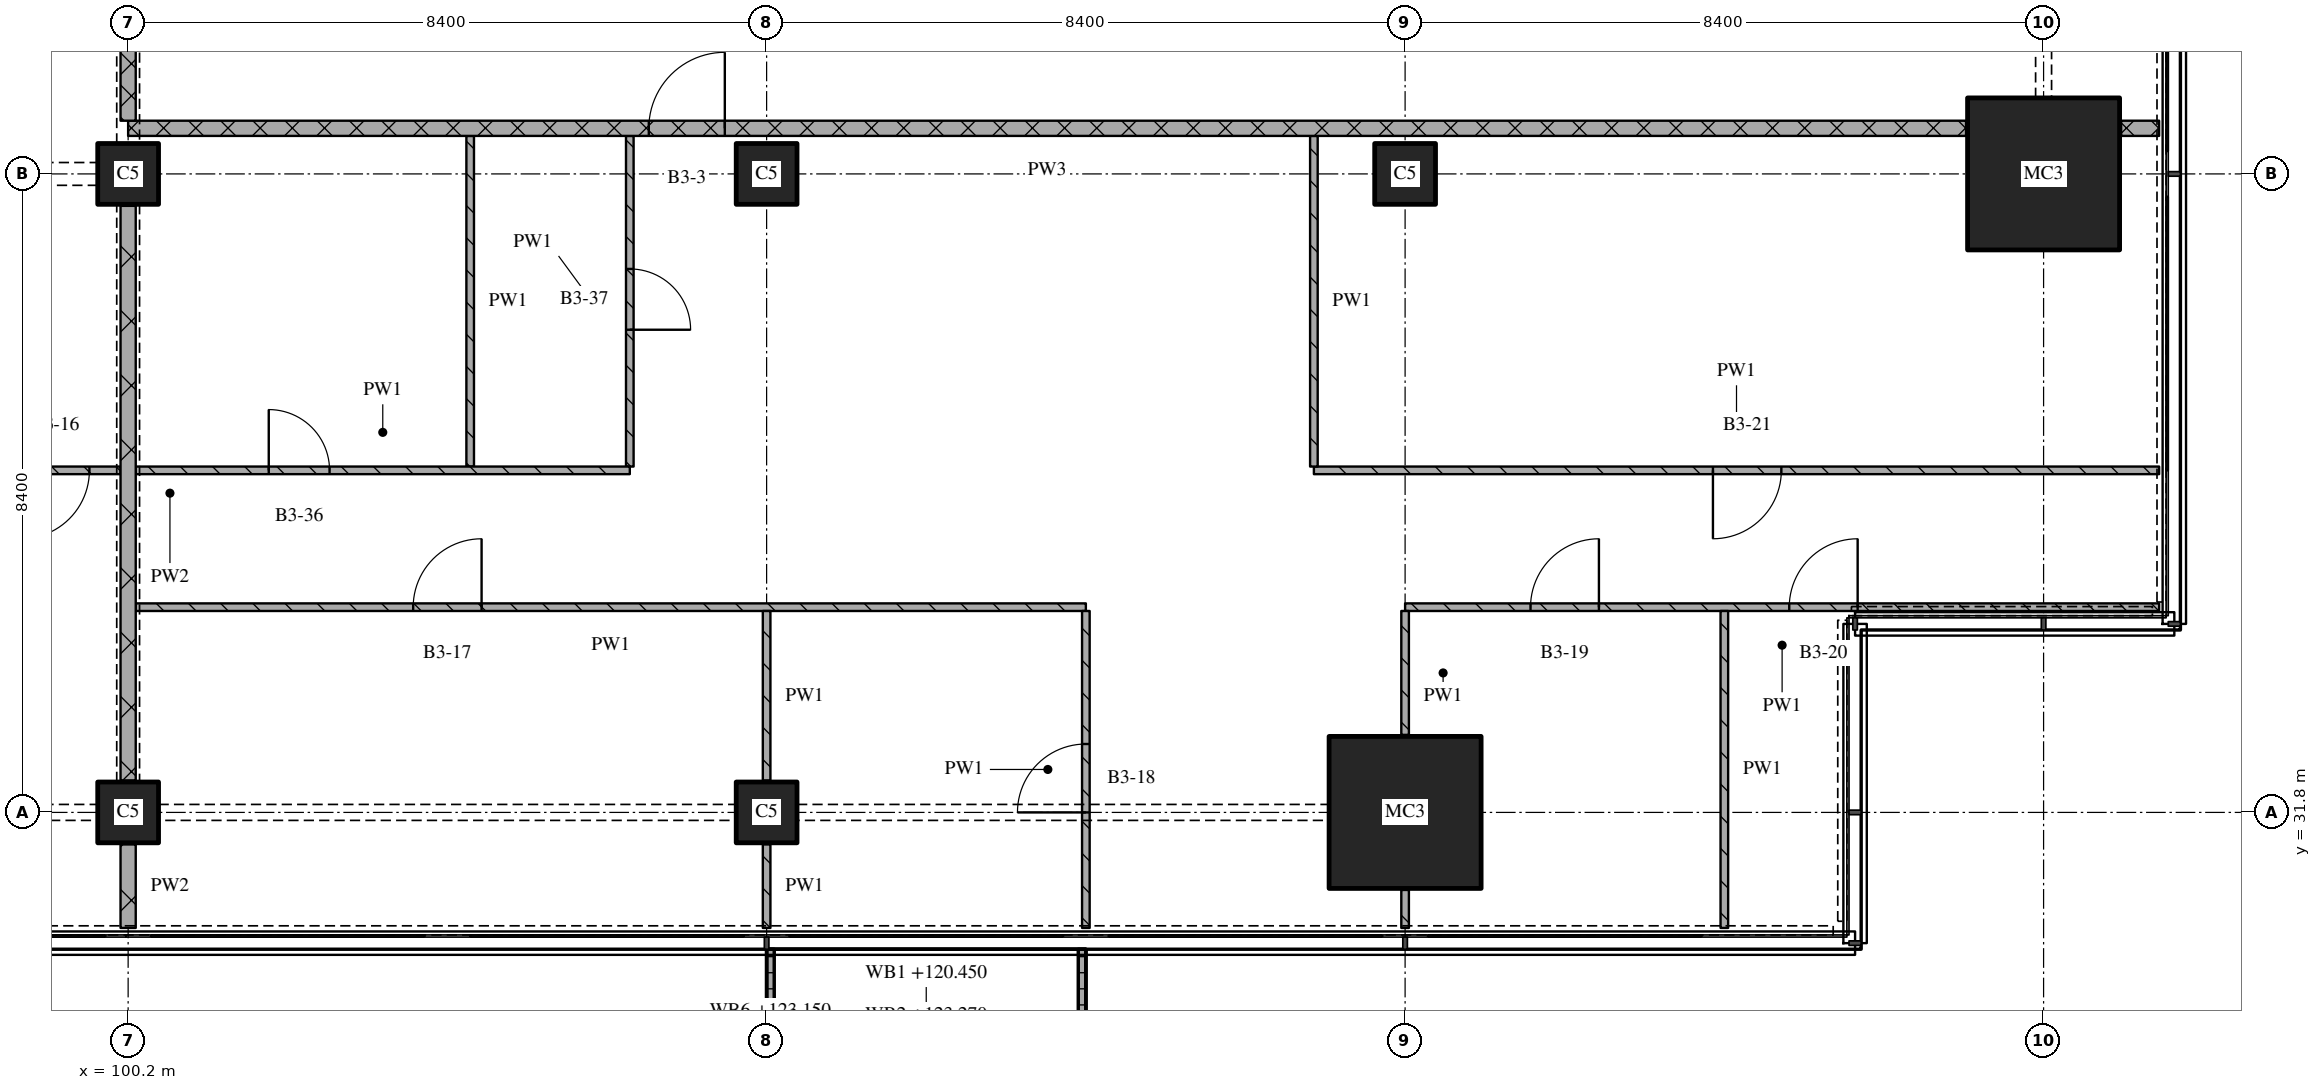
"""IFC4 building model, lengths in metres.
Left out: names, types, materials, properties, quantities, classifications, styles, units other than length and angle.
Written with IfcOpenShell. Run it as: python <this file> out.ifc"""

import sys

from ifc_helpers import new_model, si_unit, direction, frame, frame_2d, origin, origin_2d, place, context, subcontext, project, spatial, polyline, rectangle, outline, extrude, element, fill, save


model = new_model("IFC4")
c1 = context("Model", 3, precision=1e-05, world=origin(), true_north=direction((0.0, 1.0)))
c2 = subcontext(c1, "Body", "Model", "MODEL_VIEW")
j1 = project(units=[si_unit("LENGTHUNIT", "METRE"), si_unit("PLANEANGLEUNIT", "RADIAN")], contexts=[c1])
p1 = place(None, origin())
s1 = spatial("IfcSite", under=j1, at=p1, CompositionType="ELEMENT")
p2 = place(p1, origin())
s2 = spatial("IfcBuilding", under=s1, at=p2, CompositionType="ELEMENT")
p3 = place(p2, frame((0.0, 0.0, 120.45)))
s3 = spatial("IfcBuildingStorey", under=s2, at=p3, CompositionType="ELEMENT", Elevation=120.45)
for number, where, z_axis, x_axis in (
    (1, (100.2, 31.8, 0.0), (0.0, 0.0, 1.0), (1.0, 0.0, 0.0)),
    (2, (100.2, 40.2, 0.0), (0.0, 0.0, 1.0), (1.0, 0.0, 0.0)),
    (3, (108.6, 31.8, 0.0), (0.0, 0.0, 1.0), (1.0, 0.0, 0.0)),
    (4, (108.6, 40.2, 0.0), (0.0, 0.0, 1.0), (1.0, 0.0, 0.0)),
):
    element("IfcColumn", number, at=place(p3, frame(where, z_axis=z_axis, x_axis=x_axis)), inside=s3, PredefinedType="COLUMN", context=c2, shape_type="SweptSolid", body=[
        extrude(rectangle(XDim=0.8, YDim=0.8, at=origin_2d()), origin(), (0.0, 0.0, 1.0), 3.6),
    ])
p4 = place(p3, frame((117.0, 31.8, 0.0), z_axis=(0.0, 0.0, 1.0), x_axis=(1.0, 0.0, 0.0)))
e5 = element("IfcColumn", 5, at=p4, inside=s3, PredefinedType="COLUMN", context=c2, shape_type="SweptSolid", body=[
    extrude(rectangle(XDim=2.0, YDim=2.0, at=origin_2d()), origin(), (0.0, 0.0, 1.0), 3.6),
])
p5 = place(p3, frame((117.0, 40.2, 0.0), z_axis=(0.0, 0.0, 1.0), x_axis=(1.0, 0.0, 0.0)))
e6 = element("IfcColumn", 6, at=p5, inside=s3, PredefinedType="COLUMN", context=c2, shape_type="SweptSolid", body=[
    extrude(rectangle(XDim=0.8, YDim=0.8, at=origin_2d()), origin(), (0.0, 0.0, 1.0), 3.6),
])
p6 = place(p3, frame((125.4, 40.2, 0.0), z_axis=(0.0, 0.0, 1.0), x_axis=(1.0, 0.0, 0.0)))
e7 = element("IfcColumn", 7, at=p6, inside=s3, PredefinedType="COLUMN", context=c2, shape_type="SweptSolid", body=[
    extrude(rectangle(XDim=2.0, YDim=2.0, at=origin_2d()), origin(), (0.0, 0.0, 1.0), 3.6),
])
p7 = place(p3, origin())
e8 = element("IfcWall", 8, at=p7, inside=s3, PredefinedType="SOLIDWALL", context=c2, shape_type="SweptSolid", body=[
    extrude(outline(polyline([(108.6, 30.0), (108.7, 30.0), (108.7, 28.367), (112.7, 28.367), (112.7, 30.0), (112.8, 30.0), (112.8, 28.267), (108.6, 28.267), (108.6, 30.0)])), origin(), (0.0, 0.0, 1.0), 1.0),
])
p8 = place(p3, frame((112.8, 34.5, 0.0), z_axis=(0.0, 0.0, 1.0), x_axis=(-1.0, 0.0, 0.0)))
e9 = element("IfcWall", 9, at=p8, inside=s3, PredefinedType="PARTITIONING", context=c2, shape_type="SweptSolid", body=[
    extrude(rectangle(XDim=12.5, YDim=0.1, at=frame_2d((6.25, 0.0))), origin(), (0.0, 0.0, 1.0), 3.32),
])
p9 = place(p8, frame((7.95, 0.0, 0.0)))
e10 = element("IfcOpeningElement", 10, at=p9, cuts=e9, PredefinedType="OPENING", context=c2, shape_type="SweptSolid", body=[
    extrude(rectangle(XDim=0.9, YDim=2.1, at=frame_2d((0.45, 1.05))), frame((0.0, 0.06, 0.0), z_axis=(0.0, -1.0, 0.0), x_axis=(1.0, 0.0, 0.0)), (0.0, 0.0, 1.0), 0.12),
])
p10 = place(p3, frame((126.92, 34.5, 0.0), z_axis=(0.0, 0.0, 1.0), x_axis=(-1.0, 0.0, 0.0)))
e11 = element("IfcWall", 11, at=p10, inside=s3, PredefinedType="PARTITIONING", context=c2, shape_type="SweptSolid", body=[
    extrude(rectangle(XDim=9.92, YDim=0.1, at=frame_2d((4.96, 0.0))), origin(), (0.0, 0.0, 1.0), 3.32),
])
p11 = place(p10, frame((3.966, 0.0, 0.0)))
e12 = element("IfcOpeningElement", 12, at=p11, cuts=e11, PredefinedType="OPENING", context=c2, shape_type="SweptSolid", body=[
    extrude(rectangle(XDim=0.9, YDim=2.1, at=frame_2d((0.45, 1.05))), frame((0.0, 0.06, 0.0), z_axis=(0.0, -1.0, 0.0), x_axis=(1.0, 0.0, 0.0)), (0.0, 0.0, 1.0), 0.12),
])
p12 = place(p10, frame((7.37, 0.0, 0.0)))
e13 = element("IfcOpeningElement", 13, at=p12, cuts=e11, PredefinedType="OPENING", context=c2, shape_type="SweptSolid", body=[
    extrude(rectangle(XDim=0.9, YDim=2.1, at=frame_2d((0.45, 1.05))), frame((0.0, 0.06, 0.0), z_axis=(0.0, -1.0, 0.0), x_axis=(1.0, 0.0, 0.0)), (0.0, 0.0, 1.0), 0.12),
])
p13 = place(p3, frame((115.8, 36.3, 0.0), z_axis=(0.0, 0.0, 1.0), x_axis=(1.0, 0.0, 0.0)))
e14 = element("IfcWall", 14, at=p13, inside=s3, PredefinedType="PARTITIONING", context=c2, shape_type="SweptSolid", body=[
    extrude(rectangle(XDim=11.12, YDim=0.1, at=frame_2d((5.56, 0.0))), origin(), (0.0, 0.0, 1.0), 3.32),
])
p14 = place(p13, frame((5.25, 0.0, 0.0)))
e15 = element("IfcOpeningElement", 15, at=p14, cuts=e14, PredefinedType="OPENING", context=c2, shape_type="SweptSolid", body=[
    extrude(rectangle(XDim=0.9, YDim=2.1, at=frame_2d((0.45, 1.05))), frame((0.0, 0.06, 0.0), z_axis=(0.0, -1.0, 0.0), x_axis=(1.0, 0.0, 0.0)), (0.0, 0.0, 1.0), 0.12),
])
p15 = place(p3, frame((124.38, 40.8, 0.0), z_axis=(0.0, 0.0, 1.0), x_axis=(-1.0, 0.0, 0.0)))
e16 = element("IfcWall", 16, at=p15, inside=s3, PredefinedType="PARTITIONING", context=c2, shape_type="SweptSolid", body=[
    extrude(rectangle(XDim=24.18, YDim=0.2, at=frame_2d((12.09, 0.0))), origin(), (0.0, 0.0, 1.0), 3.32),
])
p16 = place(p15, frame((16.33, 0.0, 0.0)))
e17 = element("IfcOpeningElement", 17, at=p16, cuts=e16, PredefinedType="OPENING", context=c2, shape_type="SweptSolid", body=[
    extrude(rectangle(XDim=1.0, YDim=2.1, at=frame_2d((0.5, 1.05))), frame((0.0, 0.11, 0.0), z_axis=(0.0, -1.0, 0.0), x_axis=(1.0, 0.0, 0.0)), (0.0, 0.0, 1.0), 0.22),
])
p17 = place(p3, frame((126.42, 40.8, 0.0), z_axis=(0.0, 0.0, 1.0), x_axis=(1.0, 0.0, 0.0)))
e18 = element("IfcWall", 18, at=p17, inside=s3, PredefinedType="PARTITIONING", context=c2, shape_type="SweptSolid", body=[
    extrude(rectangle(XDim=0.5, YDim=0.2, at=frame_2d((0.25, 0.0))), origin(), (0.0, 0.0, 1.0), 3.32),
])
p18 = place(p3, frame((100.2, 43.1, 0.0), z_axis=(0.0, 0.0, 1.0), x_axis=(0.0, -1.0, 0.0)))
e19 = element("IfcWall", 19, at=p18, inside=s3, PredefinedType="PARTITIONING", context=c2, shape_type="SweptSolid", body=[
    extrude(rectangle(XDim=2.2, YDim=0.2, at=frame_2d((1.1, 0.0))), origin(), (0.0, 0.0, 1.0), 2.43),
])
p19 = place(p3, frame((100.2, 31.38, 0.0), z_axis=(0.0, 0.0, 1.0), x_axis=(0.0, -1.0, 0.0)))
e20 = element("IfcWall", 20, at=p19, inside=s3, PredefinedType="PARTITIONING", context=c2, shape_type="SweptSolid", body=[
    extrude(rectangle(XDim=1.1, YDim=0.2, at=frame_2d((0.55, 0.0))), origin(), (0.0, 0.0, 1.0), 3.32),
])
p20 = place(p3, frame((100.2, 39.78, 0.0), z_axis=(0.0, 0.0, 1.0), x_axis=(0.0, -1.0, 0.0)))
e21 = element("IfcWall", 21, at=p20, inside=s3, PredefinedType="PARTITIONING", context=c2, shape_type="SweptSolid", body=[
    extrude(rectangle(XDim=7.56, YDim=0.2, at=frame_2d((3.78, 0.0))), origin(), (0.0, 0.0, 1.0), 2.83),
])
p21 = place(p3, frame((104.7, 40.7, 0.0), z_axis=(0.0, 0.0, 1.0), x_axis=(0.0, -1.0, 0.0)))
e22 = element("IfcWall", 22, at=p21, inside=s3, PredefinedType="PARTITIONING", context=c2, shape_type="SweptSolid", body=[
    extrude(rectangle(XDim=4.35, YDim=0.1, at=frame_2d((2.175, 0.0))), origin(), (0.0, 0.0, 1.0), 3.32),
])
p22 = place(p3, frame((106.8, 36.35, 0.0), z_axis=(0.0, 0.0, 1.0), x_axis=(0.0, 1.0, 0.0)))
e23 = element("IfcWall", 23, at=p22, inside=s3, PredefinedType="PARTITIONING", context=c2, shape_type="SweptSolid", body=[
    extrude(rectangle(XDim=4.35, YDim=0.1, at=frame_2d((2.175, 0.0))), origin(), (0.0, 0.0, 1.0), 3.32),
])
p23 = place(p22, frame((1.8, 0.0, 0.0)))
e24 = element("IfcOpeningElement", 24, at=p23, cuts=e23, PredefinedType="OPENING", context=c2, shape_type="SweptSolid", body=[
    extrude(rectangle(XDim=0.8, YDim=2.1, at=frame_2d((0.4, 1.05))), frame((0.0, 0.06, 0.0), z_axis=(0.0, -1.0, 0.0), x_axis=(1.0, 0.0, 0.0)), (0.0, 0.0, 1.0), 0.12),
])
p24 = place(p3, frame((108.6, 31.38, 0.0), z_axis=(0.0, 0.0, 1.0), x_axis=(0.0, -1.0, 0.0)))
e25 = element("IfcWall", 25, at=p24, inside=s3, PredefinedType="PARTITIONING", context=c2, shape_type="SweptSolid", body=[
    extrude(rectangle(XDim=1.1, YDim=0.1, at=frame_2d((0.55, 0.0))), origin(), (0.0, 0.0, 1.0), 3.32),
])
p25 = place(p3, frame((108.6, 34.45, 0.0), z_axis=(0.0, 0.0, 1.0), x_axis=(0.0, -1.0, 0.0)))
e26 = element("IfcWall", 26, at=p25, inside=s3, PredefinedType="PARTITIONING", context=c2, shape_type="SweptSolid", body=[
    extrude(rectangle(XDim=2.23, YDim=0.1, at=frame_2d((1.115, 0.0))), origin(), (0.0, 0.0, 1.0), 3.32),
])
p26 = place(p3, frame((112.8, 30.28, 0.0), z_axis=(0.0, 0.0, 1.0), x_axis=(0.0, 1.0, 0.0)))
e27 = element("IfcWall", 27, at=p26, inside=s3, PredefinedType="PARTITIONING", context=c2, shape_type="SweptSolid", body=[
    extrude(rectangle(XDim=4.17, YDim=0.1, at=frame_2d((2.085, 0.0))), origin(), (0.0, 0.0, 1.0), 3.32),
])
p27 = place(p26, frame((1.52, 0.0, 0.0)))
e28 = element("IfcOpeningElement", 28, at=p27, cuts=e27, PredefinedType="OPENING", context=c2, shape_type="SweptSolid", body=[
    extrude(rectangle(XDim=0.9, YDim=2.1, at=frame_2d((0.45, 1.05))), frame((0.0, 0.06, 0.0), z_axis=(0.0, -1.0, 0.0), x_axis=(1.0, 0.0, 0.0)), (0.0, 0.0, 1.0), 0.12),
])
p28 = place(p3, frame((115.8, 40.7, 0.0), z_axis=(0.0, 0.0, 1.0), x_axis=(0.0, -1.0, 0.0)))
e29 = element("IfcWall", 29, at=p28, inside=s3, PredefinedType="PARTITIONING", context=c2, shape_type="SweptSolid", body=[
    extrude(rectangle(XDim=4.35, YDim=0.1, at=frame_2d((2.175, 0.0))), origin(), (0.0, 0.0, 1.0), 3.32),
])
p29 = place(p3, frame((117.0, 30.78, 0.0), z_axis=(0.0, 0.0, 1.0), x_axis=(0.0, -1.0, 0.0)))
e30 = element("IfcWall", 30, at=p29, inside=s3, PredefinedType="PARTITIONING", context=c2, shape_type="SweptSolid", body=[
    extrude(rectangle(XDim=0.5, YDim=0.1, at=frame_2d((0.25, 0.0))), origin(), (0.0, 0.0, 1.0), 3.32),
])
p30 = place(p3, frame((117.0, 34.45, 0.0), z_axis=(0.0, 0.0, 1.0), x_axis=(0.0, -1.0, 0.0)))
e31 = element("IfcWall", 31, at=p30, inside=s3, PredefinedType="PARTITIONING", context=c2, shape_type="SweptSolid", body=[
    extrude(rectangle(XDim=1.63, YDim=0.1, at=frame_2d((0.815, 0.0))), origin(), (0.0, 0.0, 1.0), 3.32),
])
p31 = place(p3, frame((121.2, 34.45, 0.0), z_axis=(0.0, 0.0, 1.0), x_axis=(0.0, -1.0, 0.0)))
e32 = element("IfcWall", 32, at=p31, inside=s3, PredefinedType="PARTITIONING", context=c2, shape_type="SweptSolid", body=[
    extrude(rectangle(XDim=4.17, YDim=0.1, at=frame_2d((2.085, 0.0))), origin(), (0.0, 0.0, 1.0), 3.32),
])
p32 = place(p3, frame((90.6, 36.3, 0.0), z_axis=(0.0, 0.0, 1.0), x_axis=(1.0, 0.0, 0.0)))
e33 = element("IfcWall", 33, at=p32, inside=s3, PredefinedType="PARTITIONING", context=c2, shape_type="SweptSolid", body=[
    extrude(rectangle(XDim=9.5, YDim=0.1, at=frame_2d((4.75, 0.0))), origin(), (0.0, 0.0, 1.0), 3.32),
])
p33 = place(p32, frame((5.361, 0.0, 0.0)))
e34 = element("IfcOpeningElement", 34, at=p33, cuts=e33, PredefinedType="OPENING", context=c2, shape_type="SweptSolid", body=[
    extrude(rectangle(XDim=0.8, YDim=2.1, at=frame_2d((0.4, 1.05))), frame((0.0, 0.06, 0.0), z_axis=(0.0, -1.0, 0.0), x_axis=(1.0, 0.0, 0.0)), (0.0, 0.0, 1.0), 0.12),
])
p34 = place(p32, frame((8.191, 0.0, 0.0)))
e35 = element("IfcOpeningElement", 35, at=p34, cuts=e33, PredefinedType="OPENING", context=c2, shape_type="SweptSolid", body=[
    extrude(rectangle(XDim=0.9, YDim=2.1, at=frame_2d((0.45, 1.05))), frame((0.0, 0.06, 0.0), z_axis=(0.0, -1.0, 0.0), x_axis=(1.0, 0.0, 0.0)), (0.0, 0.0, 1.0), 0.12),
])
p35 = place(p3, frame((100.3, 36.3, 0.0), z_axis=(0.0, 0.0, 1.0), x_axis=(1.0, 0.0, 0.0)))
e36 = element("IfcWall", 36, at=p35, inside=s3, PredefinedType="PARTITIONING", context=c2, shape_type="SweptSolid", body=[
    extrude(rectangle(XDim=6.5, YDim=0.1, at=frame_2d((3.25, 0.0))), origin(), (0.0, 0.0, 1.0), 3.32),
])
p36 = place(p35, frame((1.75, 0.0, 0.0)))
e37 = element("IfcOpeningElement", 37, at=p36, cuts=e36, PredefinedType="OPENING", context=c2, shape_type="SweptSolid", body=[
    extrude(rectangle(XDim=0.8, YDim=2.1, at=frame_2d((0.4, 1.05))), frame((0.0, 0.06, 0.0), z_axis=(0.0, -1.0, 0.0), x_axis=(1.0, 0.0, 0.0)), (0.0, 0.0, 1.0), 0.12),
])
p37 = place(p9, origin())
e38 = element("IfcDoor", 38, at=p37, inside=s3, OperationType="SINGLE_SWING_RIGHT", PredefinedType="DOOR", context=c2, shape_type="SweptSolid", body=[
    extrude(rectangle(XDim=0.9, YDim=2.1, at=frame_2d((0.45, 1.05))), frame((0.0, 0.025, 0.0), z_axis=(0.0, -1.0, 0.0), x_axis=(1.0, 0.0, 0.0)), (0.0, 0.0, 1.0), 0.05),
])
fill(e10, e38)
p38 = place(p11, origin())
e39 = element("IfcDoor", 39, at=p38, inside=s3, OperationType="SINGLE_SWING_RIGHT", PredefinedType="DOOR", context=c2, shape_type="SweptSolid", body=[
    extrude(rectangle(XDim=0.9, YDim=2.1, at=frame_2d((0.45, 1.05))), frame((0.0, 0.025, 0.0), z_axis=(0.0, -1.0, 0.0), x_axis=(1.0, 0.0, 0.0)), (0.0, 0.0, 1.0), 0.05),
])
fill(e12, e39)
p39 = place(p12, origin())
e40 = element("IfcDoor", 40, at=p39, inside=s3, OperationType="SINGLE_SWING_RIGHT", PredefinedType="DOOR", context=c2, shape_type="SweptSolid", body=[
    extrude(rectangle(XDim=0.9, YDim=2.1, at=frame_2d((0.45, 1.05))), frame((0.0, 0.025, 0.0), z_axis=(0.0, -1.0, 0.0), x_axis=(1.0, 0.0, 0.0)), (0.0, 0.0, 1.0), 0.05),
])
fill(e13, e40)
p40 = place(p14, origin())
e41 = element("IfcDoor", 41, at=p40, inside=s3, OperationType="SINGLE_SWING_RIGHT", PredefinedType="DOOR", context=c2, shape_type="SweptSolid", body=[
    extrude(rectangle(XDim=0.9, YDim=2.1, at=frame_2d((0.45, 1.05))), frame((0.0, 0.025, 0.0), z_axis=(0.0, -1.0, 0.0), x_axis=(1.0, 0.0, 0.0)), (0.0, 0.0, 1.0), 0.05),
])
fill(e15, e41)
p41 = place(p16, origin())
e42 = element("IfcDoor", 42, at=p41, inside=s3, OperationType="SINGLE_SWING_RIGHT", PredefinedType="DOOR", context=c2, shape_type="SweptSolid", body=[
    extrude(rectangle(XDim=1.0, YDim=2.1, at=frame_2d((0.5, 1.05))), frame((0.0, 0.025, 0.0), z_axis=(0.0, -1.0, 0.0), x_axis=(1.0, 0.0, 0.0)), (0.0, 0.0, 1.0), 0.05),
])
fill(e17, e42)
p42 = place(p23, origin())
e43 = element("IfcDoor", 43, at=p42, inside=s3, OperationType="SINGLE_SWING_RIGHT", PredefinedType="DOOR", context=c2, shape_type="SweptSolid", body=[
    extrude(rectangle(XDim=0.8, YDim=2.1, at=frame_2d((0.4, 1.05))), frame((0.0, 0.025, 0.0), z_axis=(0.0, -1.0, 0.0), x_axis=(1.0, 0.0, 0.0)), (0.0, 0.0, 1.0), 0.05),
])
fill(e24, e43)
p43 = place(p27, origin())
e44 = element("IfcDoor", 44, at=p43, inside=s3, OperationType="SINGLE_SWING_LEFT", PredefinedType="DOOR", context=c2, shape_type="SweptSolid", body=[
    extrude(rectangle(XDim=0.9, YDim=2.1, at=frame_2d((0.45, 1.05))), frame((0.0, 0.025, 0.0), z_axis=(0.0, -1.0, 0.0), x_axis=(1.0, 0.0, 0.0)), (0.0, 0.0, 1.0), 0.05),
])
fill(e28, e44)
p44 = place(p34, origin())
e45 = element("IfcDoor", 45, at=p44, inside=s3, OperationType="SINGLE_SWING_RIGHT", PredefinedType="DOOR", context=c2, shape_type="SweptSolid", body=[
    extrude(rectangle(XDim=0.9, YDim=2.1, at=frame_2d((0.45, 1.05))), frame((0.0, 0.025, 0.0), z_axis=(0.0, -1.0, 0.0), x_axis=(1.0, 0.0, 0.0)), (0.0, 0.0, 1.0), 0.05),
])
fill(e35, e45)
p45 = place(p36, origin())
e46 = element("IfcDoor", 46, at=p45, inside=s3, OperationType="SINGLE_SWING_LEFT", PredefinedType="DOOR", context=c2, shape_type="SweptSolid", body=[
    extrude(rectangle(XDim=0.8, YDim=2.1, at=frame_2d((0.4, 1.05))), frame((0.0, 0.025, 0.0), z_axis=(0.0, -1.0, 0.0), x_axis=(1.0, 0.0, 0.0)), (0.0, 0.0, 1.0), 0.05),
])
fill(e37, e46)
save(model, sys.argv[1])
